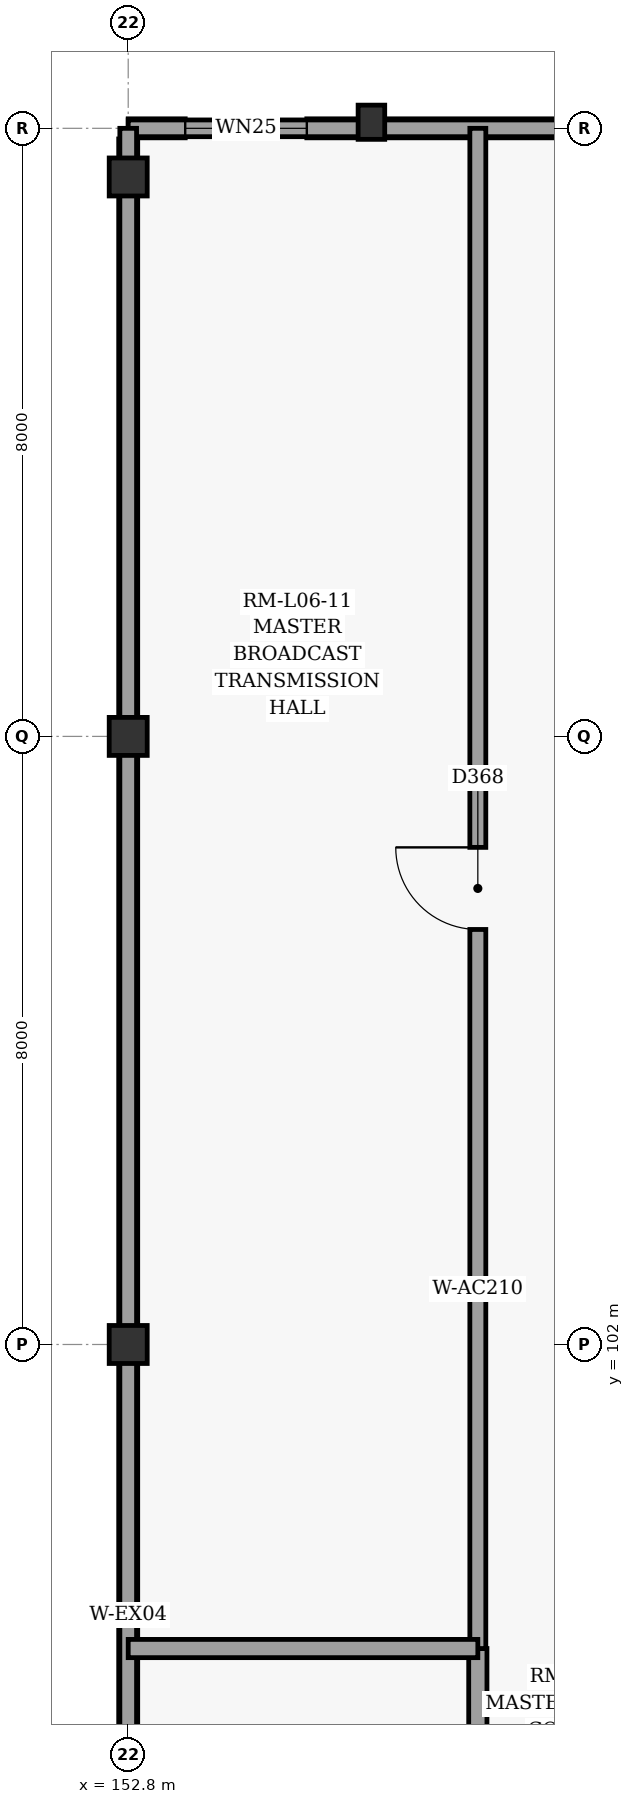
"""IFC4 building model, lengths in metres.
Left out: names, types, materials, properties, quantities, classifications, styles, units other than length and angle.
Written with IfcOpenShell. Run it as: python <this file> out.ifc"""

import sys

from ifc_helpers import new_model, si_unit, direction, frame, frame_2d, origin, origin_2d, place, context, subcontext, project, spatial, rectangle, extrude, element, fill, save


model = new_model("IFC4")
c1 = context("Model", 3, precision=1e-05, world=origin(), true_north=direction((0.0, 1.0)))
c2 = subcontext(c1, "Body", "Model", "MODEL_VIEW")
j1 = project(units=[si_unit("LENGTHUNIT", "METRE"), si_unit("PLANEANGLEUNIT", "RADIAN")], contexts=[c1])
p1 = place(None, origin())
s1 = spatial("IfcSite", under=j1, at=p1, CompositionType="ELEMENT")
p2 = place(p1, origin())
s2 = spatial("IfcBuilding", under=s1, at=p2, CompositionType="ELEMENT")
p3 = place(p2, frame((0.0, 0.0, 29.4)))
s3 = spatial("IfcBuildingStorey", under=s2, at=p3, CompositionType="ELEMENT", Elevation=29.4)
for number, where, z_axis, x_axis in (
    (1, (152.8, 102.0, 0.0), (0.0, 0.0, 1.0), (1.0, 0.0, 0.0)),
    (2, (152.8, 110.0, 0.0), (0.0, 0.0, 1.0), (1.0, 0.0, 0.0)),
    (3, (152.8, 117.36, 0.0), (0.0, 0.0, 1.0), (1.0, 0.0, 0.0)),
):
    element("IfcColumn", number, at=place(p3, frame(where, z_axis=z_axis, x_axis=x_axis)), inside=s3, PredefinedType="COLUMN", context=c2, shape_type="SweptSolid", body=[
        extrude(rectangle(XDim=0.5, YDim=0.5, at=origin_2d()), origin(), (0.0, 0.0, 1.0), 4.5),
    ])
p4 = place(p3, frame((156.0, 118.08, 0.0), z_axis=(0.0, 0.0, 1.0), x_axis=(0.0, 1.0, 0.0)))
e4 = element("IfcColumn", 4, at=p4, inside=s3, PredefinedType="PILASTER", context=c2, shape_type="SweptSolid", body=[
    extrude(rectangle(XDim=0.35, YDim=0.45, at=origin_2d()), origin(), (0.0, 0.0, 1.0), 4.5),
])
p5 = place(p3, frame((152.8, 118.0, 0.0), z_axis=(0.0, 0.0, 1.0), x_axis=(1.0, 0.0, 0.0)))
e5 = element("IfcWall", 5, at=p5, inside=s3, PredefinedType="SOLIDWALL", context=c2, shape_type="SweptSolid", body=[
    extrude(rectangle(XDim=19.2, YDim=0.25, at=frame_2d((9.6, 0.0))), origin(), (0.0, 0.0, 1.0), 4.255),
])
p6 = place(p5, frame((0.75, 0.0, 0.9)))
e6 = element("IfcOpeningElement", 6, at=p6, cuts=e5, PredefinedType="OPENING", context=c2, shape_type="SweptSolid", body=[
    extrude(rectangle(XDim=1.6, YDim=1.65, at=frame_2d((0.8, 0.825))), frame((0.0, 0.135, 0.0), z_axis=(0.0, -1.0, 0.0), x_axis=(1.0, 0.0, 0.0)), (0.0, 0.0, 1.0), 0.27),
])
p7 = place(p5, frame((10.0, 0.0, 0.9)))
e7 = element("IfcOpeningElement", 7, at=p7, cuts=e5, PredefinedType="OPENING", context=c2, shape_type="SweptSolid", body=[
    extrude(rectangle(XDim=1.4, YDim=2.1, at=frame_2d((0.7, 1.05))), frame((0.0, 0.135, 0.0), z_axis=(0.0, -1.0, 0.0), x_axis=(1.0, 0.0, 0.0)), (0.0, 0.0, 1.0), 0.27),
])
p8 = place(p3, frame((152.8, 71.74, 0.0), z_axis=(0.0, 0.0, 1.0), x_axis=(0.0, 1.0, 0.0)))
e8 = element("IfcWall", 8, at=p8, inside=s3, PredefinedType="SOLIDWALL", context=c2, shape_type="SweptSolid", body=[
    extrude(rectangle(XDim=46.12, YDim=0.25, at=frame_2d((23.06, 0.0))), origin(), (0.0, 0.0, 1.0), 3.405),
])
p9 = place(p3, frame((152.8, 118.0, 4.5), z_axis=(0.0, 0.0, 1.0), x_axis=(1.0, 0.0, 0.0)))
e9 = element("IfcWall", 9, at=p9, inside=s3, PredefinedType="PARAPET", context=c2, shape_type="SweptSolid", body=[
    extrude(rectangle(XDim=19.2, YDim=0.22, at=frame_2d((9.6, 0.0))), origin(), (0.0, 0.0, 1.0), 0.95),
])
p10 = place(p3, frame((152.8, 71.6, 4.5), z_axis=(0.0, 0.0, 1.0), x_axis=(0.0, 1.0, 0.0)))
e10 = element("IfcWall", 10, at=p10, inside=s3, PredefinedType="PARAPET", context=c2, shape_type="SweptSolid", body=[
    extrude(rectangle(XDim=46.4, YDim=0.22, at=frame_2d((23.2, 0.0))), origin(), (0.0, 0.0, 1.0), 0.95),
])
p11 = place(p3, frame((157.4, 78.2, 0.0), z_axis=(0.0, 0.0, 1.0), x_axis=(0.0, 1.0, 0.0)))
e11 = element("IfcWall", 11, at=p11, inside=s3, PredefinedType="PARTITIONING", context=c2, shape_type="SweptSolid", body=[
    extrude(rectangle(XDim=19.8, YDim=0.24, at=frame_2d((9.9, 0.0))), origin(), (0.0, 0.0, 1.0), 4.255),
])
p12 = place(p11, frame((9.4, 0.0, 0.0)))
e12 = element("IfcOpeningElement", 12, at=p12, cuts=e11, PredefinedType="OPENING", context=c2, shape_type="SweptSolid", body=[
    extrude(rectangle(XDim=1.0, YDim=2.1, at=frame_2d((0.5, 1.05))), frame((0.0, 0.13, 0.0), z_axis=(0.0, -1.0, 0.0), x_axis=(1.0, 0.0, 0.0)), (0.0, 0.0, 1.0), 0.26),
])
p13 = place(p3, frame((157.4, 98.0, 0.0), z_axis=(0.0, 0.0, 1.0), x_axis=(0.0, 1.0, 0.0)))
e13 = element("IfcWall", 13, at=p13, inside=s3, PredefinedType="PARTITIONING", context=c2, shape_type="SweptSolid", body=[
    extrude(rectangle(XDim=20.0, YDim=0.21, at=frame_2d((10.0, 0.0))), origin(), (0.0, 0.0, 1.0), 4.255),
])
p14 = place(p13, frame((9.46, 0.0, 0.0)))
e14 = element("IfcOpeningElement", 14, at=p14, cuts=e13, PredefinedType="OPENING", context=c2, shape_type="SweptSolid", body=[
    extrude(rectangle(XDim=1.08, YDim=2.15, at=frame_2d((0.54, 1.075))), frame((0.0, 0.115, 0.0), z_axis=(0.0, -1.0, 0.0), x_axis=(1.0, 0.0, 0.0)), (0.0, 0.0, 1.0), 0.23),
])
p15 = place(p3, frame((152.8, 98.0, 0.0), z_axis=(0.0, 0.0, 1.0), x_axis=(1.0, 0.0, 0.0)))
e15 = element("IfcWall", 15, at=p15, inside=s3, PredefinedType="PARTITIONING", context=c2, shape_type="SweptSolid", body=[
    extrude(rectangle(XDim=4.6, YDim=0.24, at=frame_2d((2.3, 0.0))), origin(), (0.0, 0.0, 1.0), 4.255),
])
p16 = place(p6, origin())
e16 = element("IfcWindow", 16, at=p16, inside=s3, PartitioningType="SINGLE_PANEL", PredefinedType="WINDOW", context=c2, shape_type="SweptSolid", body=[
    extrude(rectangle(XDim=1.6, YDim=1.65, at=frame_2d((0.8, 0.825))), frame((0.0, 0.03, 0.0), z_axis=(0.0, -1.0, 0.0), x_axis=(1.0, 0.0, 0.0)), (0.0, 0.0, 1.0), 0.06),
])
fill(e6, e16)
p17 = place(p14, origin())
e17 = element("IfcDoor", 17, at=p17, inside=s3, OperationType="SINGLE_SWING_RIGHT", PredefinedType="DOOR", context=c2, shape_type="SweptSolid", body=[
    extrude(rectangle(XDim=1.08, YDim=2.15, at=frame_2d((0.54, 1.075))), frame((0.0, 0.025, 0.0), z_axis=(0.0, -1.0, 0.0), x_axis=(1.0, 0.0, 0.0)), (0.0, 0.0, 1.0), 0.05),
])
fill(e14, e17)
save(model, sys.argv[1])
